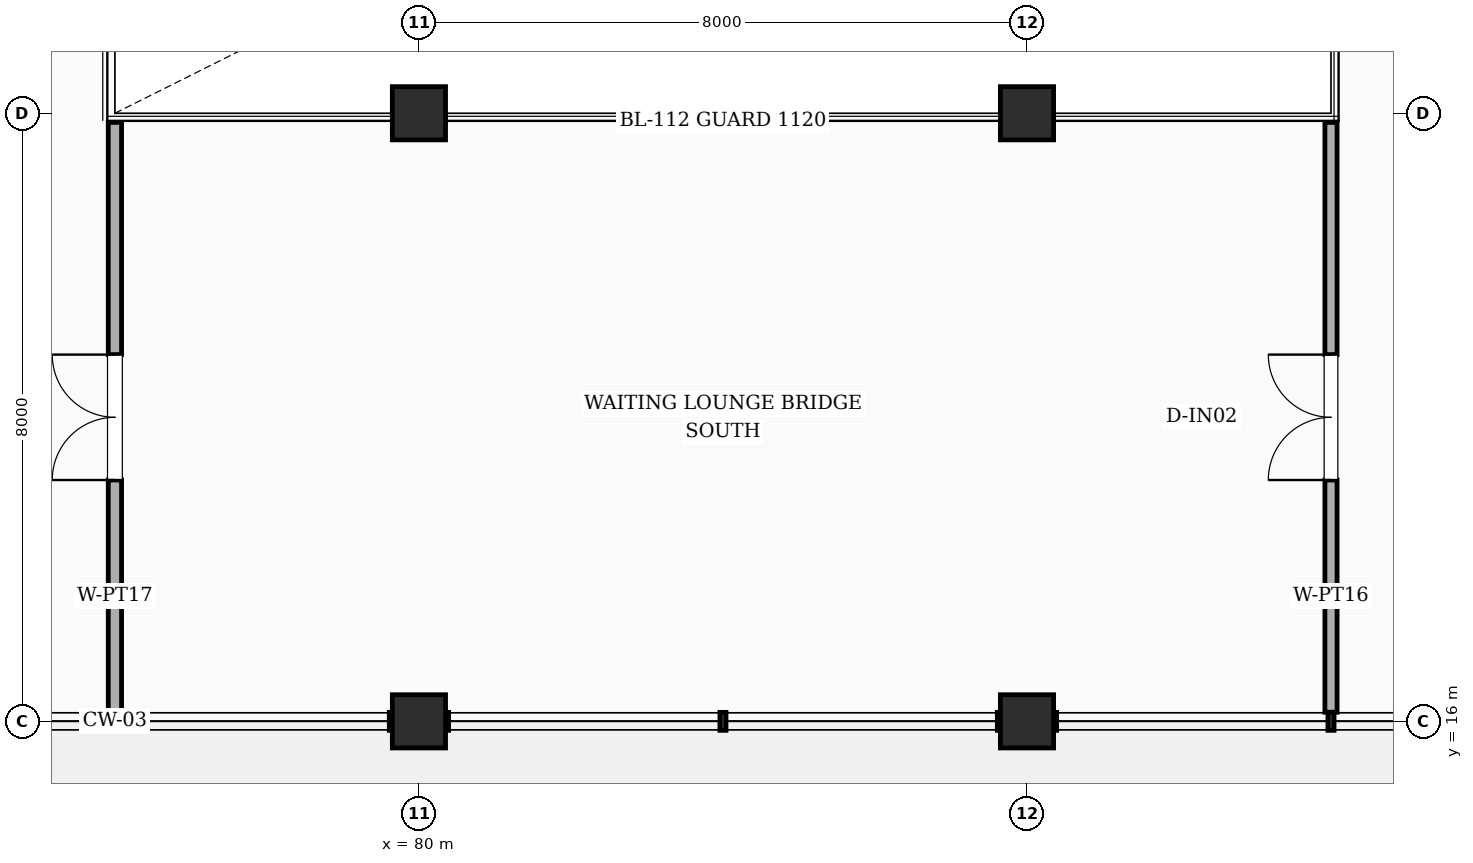
"""IFC4 building model, lengths in metres.
Left out: names, types, materials, properties, quantities, classifications, styles, units other than length and angle.
Written with IfcOpenShell. Run it as: python <this file> out.ifc"""

import sys

from ifc_helpers import new_model, si_unit, direction, frame, frame_2d, origin, origin_2d, place, context, subcontext, project, spatial, rectangle, extrude, element, fill, save


model = new_model("IFC4")
c1 = context("Model", 3, precision=1e-05, world=origin(), true_north=direction((0.0, 1.0)))
c2 = subcontext(c1, "Body", "Model", "MODEL_VIEW")
j1 = project(units=[si_unit("LENGTHUNIT", "METRE"), si_unit("PLANEANGLEUNIT", "RADIAN")], contexts=[c1])
p1 = place(None, origin())
s1 = spatial("IfcSite", under=j1, at=p1, CompositionType="ELEMENT")
p2 = place(p1, origin())
s2 = spatial("IfcBuilding", under=s1, at=p2, CompositionType="ELEMENT")
p3 = place(p2, frame((0.0, 0.0, 10.8)))
s3 = spatial("IfcBuildingStorey", under=s2, at=p3, CompositionType="ELEMENT", Elevation=10.8)
for number, where, z_axis, x_axis in (
    (1, (80.0, 16.0, 0.0), (0.0, 0.0, 1.0), (1.0, 0.0, 0.0)),
    (2, (80.0, 24.0, 0.0), (0.0, 0.0, 1.0), (1.0, 0.0, 0.0)),
    (3, (88.0, 16.0, 0.0), (0.0, 0.0, 1.0), (1.0, 0.0, 0.0)),
    (4, (88.0, 24.0, 0.0), (0.0, 0.0, 1.0), (1.0, 0.0, 0.0)),
):
    element("IfcColumn", number, at=place(p3, frame(where, z_axis=z_axis, x_axis=x_axis)), inside=s3, PredefinedType="COLUMN", context=c2, shape_type="SweptSolid", body=[
        extrude(rectangle(XDim=0.7, YDim=0.7, at=origin_2d()), origin(), (0.0, 0.0, 1.0), 4.2),
    ])
p4 = place(p3, frame((76.0, 16.12, 0.0), z_axis=(0.0, 0.0, 1.0), x_axis=(0.0, 1.0, 0.0)))
e5 = element("IfcWall", 5, at=p4, inside=s3, PredefinedType="PARTITIONING", context=c2, shape_type="SweptSolid", body=[
    extrude(rectangle(XDim=7.76, YDim=0.175, at=frame_2d((3.88, 0.0))), origin(), (0.0, 0.0, 1.0), 3.36),
])
p5 = place(p4, frame((3.055, 0.0, 0.0)))
e6 = element("IfcOpeningElement", 6, at=p5, cuts=e5, PredefinedType="OPENING", context=c2, shape_type="SweptSolid", body=[
    extrude(rectangle(XDim=1.65, YDim=2.25, at=frame_2d((0.825, 1.125))), frame((0.0, 0.097, 0.0), z_axis=(0.0, -1.0, 0.0), x_axis=(1.0, 0.0, 0.0)), (0.0, 0.0, 1.0), 0.195),
])
p6 = place(p3, frame((92.0, 16.12, 0.0), z_axis=(0.0, 0.0, 1.0), x_axis=(0.0, 1.0, 0.0)))
e7 = element("IfcWall", 7, at=p6, inside=s3, PredefinedType="PARTITIONING", context=c2, shape_type="SweptSolid", body=[
    extrude(rectangle(XDim=7.76, YDim=0.16, at=frame_2d((3.88, 0.0))), origin(), (0.0, 0.0, 1.0), 3.36),
])
p7 = place(p6, frame((3.055, 0.0, 0.0)))
e8 = element("IfcOpeningElement", 8, at=p7, cuts=e7, PredefinedType="OPENING", context=c2, shape_type="SweptSolid", body=[
    extrude(rectangle(XDim=1.65, YDim=2.25, at=frame_2d((0.825, 1.125))), frame((0.0, 0.09, 0.0), z_axis=(0.0, -1.0, 0.0), x_axis=(1.0, 0.0, 0.0)), (0.0, 0.0, 1.0), 0.18),
])
p8 = place(p5, origin())
e9 = element("IfcDoor", 9, at=p8, inside=s3, OperationType="DOUBLE_DOOR_SINGLE_SWING", PredefinedType="DOOR", context=c2, shape_type="SweptSolid", body=[
    extrude(rectangle(XDim=1.65, YDim=2.25, at=frame_2d((0.825, 1.125))), frame((0.0, 0.025, 0.0), z_axis=(0.0, -1.0, 0.0), x_axis=(1.0, 0.0, 0.0)), (0.0, 0.0, 1.0), 0.05),
])
fill(e6, e9)
p9 = place(p7, origin())
e10 = element("IfcDoor", 10, at=p9, inside=s3, OperationType="DOUBLE_DOOR_SINGLE_SWING", PredefinedType="DOOR", context=c2, shape_type="SweptSolid", body=[
    extrude(rectangle(XDim=1.65, YDim=2.25, at=frame_2d((0.825, 1.125))), frame((0.0, 0.025, 0.0), z_axis=(0.0, -1.0, 0.0), x_axis=(1.0, 0.0, 0.0)), (0.0, 0.0, 1.0), 0.05),
])
fill(e8, e10)
save(model, sys.argv[1])
